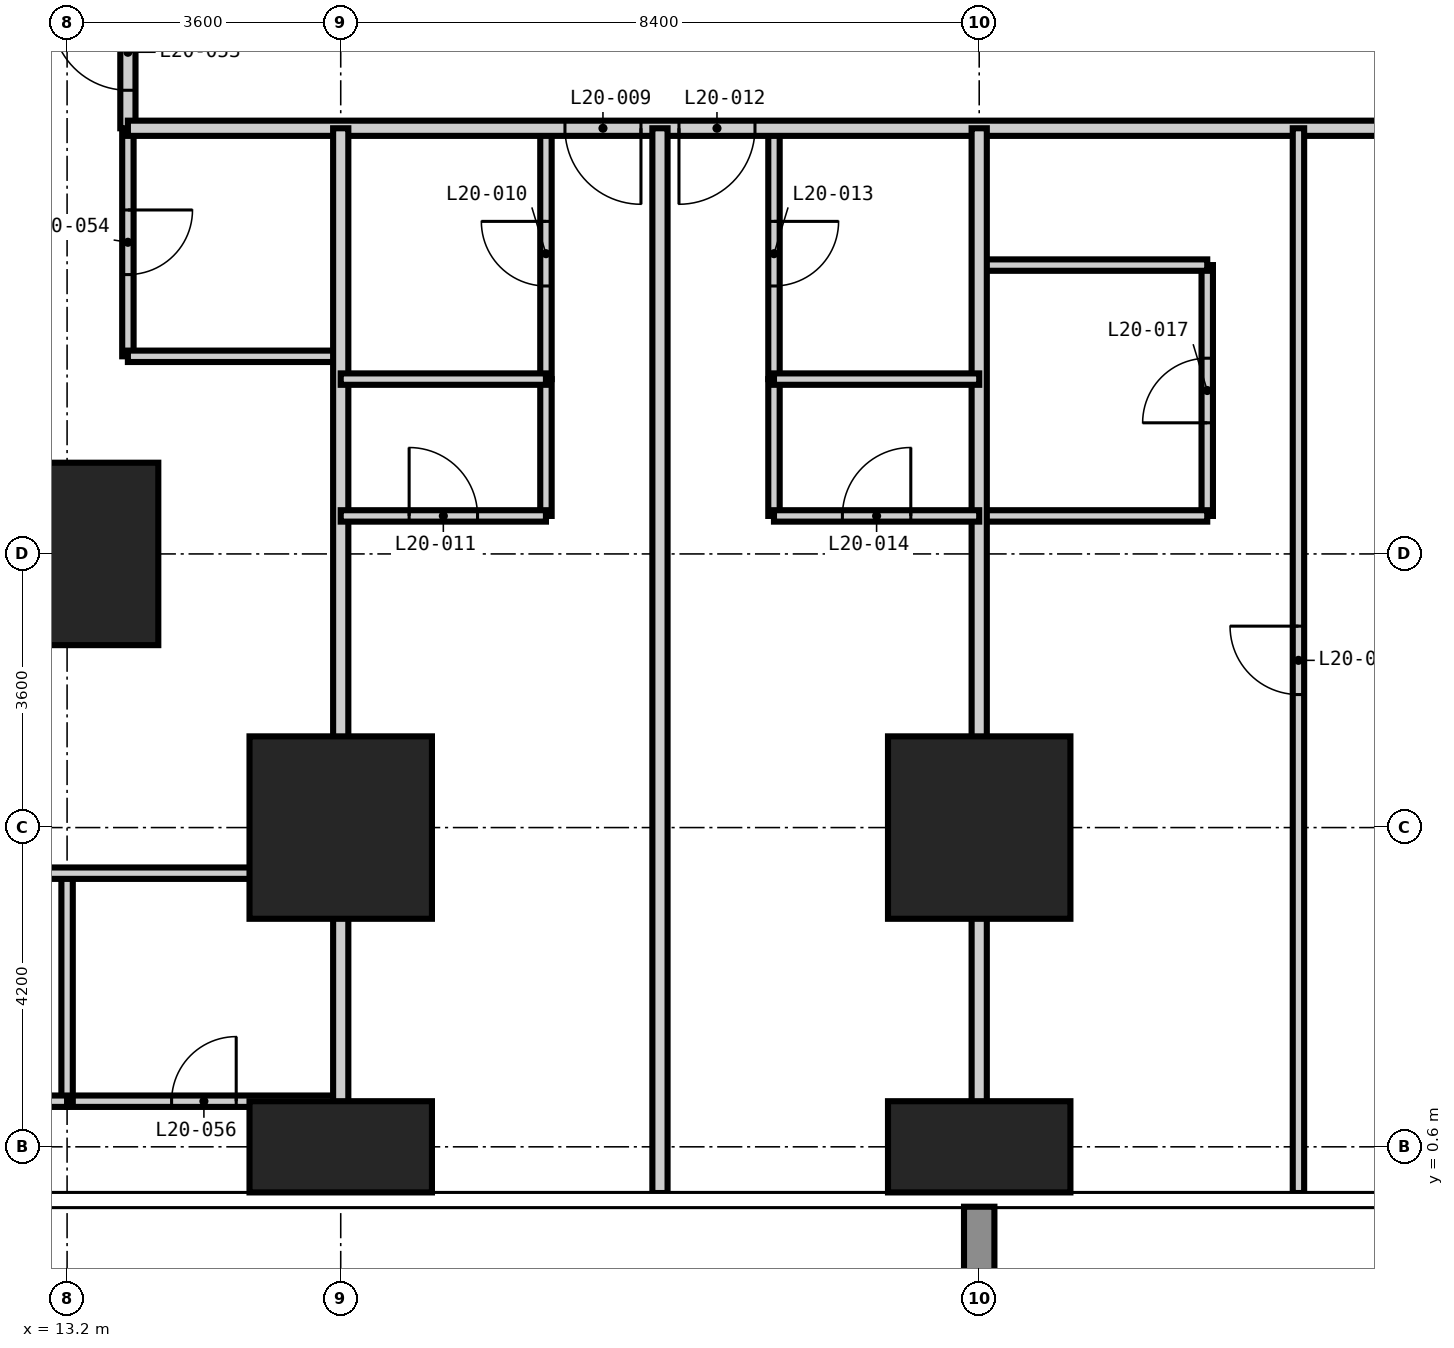
"""IFC4 building model, lengths in metres.
Left out: names, types, materials, properties, quantities, classifications, styles, units other than length and angle.
Written with IfcOpenShell. Run it as: python <this file> out.ifc"""

import sys

from ifc_helpers import new_model, si_unit, direction, frame, frame_2d, origin, origin_2d, place, context, subcontext, project, spatial, rectangle, extrude, element, fill, save


model = new_model("IFC4")
c1 = context("Model", 3, precision=1e-05, world=origin(), true_north=direction((0.0, 1.0)))
c2 = subcontext(c1, "Body", "Model", "MODEL_VIEW")
j1 = project(units=[si_unit("LENGTHUNIT", "METRE"), si_unit("PLANEANGLEUNIT", "RADIAN")], contexts=[c1])
p1 = place(None, origin())
s1 = spatial("IfcSite", under=j1, at=p1, CompositionType="ELEMENT")
p2 = place(p1, origin())
s2 = spatial("IfcBuilding", under=s1, at=p2, CompositionType="ELEMENT")
p3 = place(p2, frame((0.0, 0.0, 81.0)))
s3 = spatial("IfcBuildingStorey", under=s2, at=p3, CompositionType="ELEMENT", Elevation=81.0)
p4 = place(p3, frame((13.2, 8.4, -0.35), z_axis=(0.0, 0.0, 1.0), x_axis=(1.0, 0.0, 0.0)))
e1 = element("IfcColumn", 1, at=p4, inside=s3, PredefinedType="COLUMN", context=c2, shape_type="SweptSolid", body=[
    extrude(rectangle(XDim=2.4, YDim=2.4, at=origin_2d()), origin(), (0.0, 0.0, 1.0), 3.6),
])
p5 = place(p3, frame((16.8, 0.6, -0.35), z_axis=(0.0, 0.0, 1.0), x_axis=(1.0, 0.0, 0.0)))
e2 = element("IfcColumn", 2, at=p5, inside=s3, PredefinedType="COLUMN", context=c2, shape_type="SweptSolid", body=[
    extrude(rectangle(XDim=2.4, YDim=1.2, at=origin_2d()), origin(), (0.0, 0.0, 1.0), 3.6),
])
p6 = place(p3, frame((16.8, 4.8, -0.35), z_axis=(0.0, 0.0, 1.0), x_axis=(1.0, 0.0, 0.0)))
e3 = element("IfcColumn", 3, at=p6, inside=s3, PredefinedType="COLUMN", context=c2, shape_type="SweptSolid", body=[
    extrude(rectangle(XDim=2.4, YDim=2.4, at=origin_2d()), origin(), (0.0, 0.0, 1.0), 3.6),
])
p7 = place(p3, frame((25.2, 0.6, -0.35), z_axis=(0.0, 0.0, 1.0), x_axis=(1.0, 0.0, 0.0)))
e4 = element("IfcColumn", 4, at=p7, inside=s3, PredefinedType="COLUMN", context=c2, shape_type="SweptSolid", body=[
    extrude(rectangle(XDim=2.4, YDim=1.2, at=origin_2d()), origin(), (0.0, 0.0, 1.0), 3.6),
])
p8 = place(p3, frame((25.2, 4.8, -0.35), z_axis=(0.0, 0.0, 1.0), x_axis=(1.0, 0.0, 0.0)))
e5 = element("IfcColumn", 5, at=p8, inside=s3, PredefinedType="COLUMN", context=c2, shape_type="SweptSolid", body=[
    extrude(rectangle(XDim=2.4, YDim=2.4, at=origin_2d()), origin(), (0.0, 0.0, 1.0), 3.6),
])
p9 = place(p3, frame((14.0, 11.0, 0.0), z_axis=(0.0, 0.0, 1.0), x_axis=(0.0, 1.0, 0.0)))
e6 = element("IfcWall", 6, at=p9, inside=s3, PredefinedType="PARTITIONING", context=c2, shape_type="SweptSolid", body=[
    extrude(rectangle(XDim=3.0, YDim=0.15, at=frame_2d((1.5, 0.0))), origin(), (0.0, 0.0, 1.0), 3.25),
])
p10 = place(p9, frame((1.075, 0.0, 0.0)))
e7 = element("IfcOpeningElement", 7, at=p10, cuts=e6, PredefinedType="OPENING", context=c2, shape_type="SweptSolid", body=[
    extrude(rectangle(XDim=0.85, YDim=2.1, at=frame_2d((0.425, 1.05))), frame((0.0, 0.085, 0.0), z_axis=(0.0, -1.0, 0.0), x_axis=(1.0, 0.0, 0.0)), (0.0, 0.0, 1.0), 0.17),
])
p11 = place(p3, frame((19.5, 10.7, 0.0), z_axis=(0.0, 0.0, 1.0), x_axis=(0.0, 1.0, 0.0)))
e8 = element("IfcWall", 8, at=p11, inside=s3, PredefinedType="PARTITIONING", context=c2, shape_type="SweptSolid", body=[
    extrude(rectangle(XDim=3.3, YDim=0.15, at=frame_2d((1.65, 0.0))), origin(), (0.0, 0.0, 1.0), 3.25),
])
p12 = place(p11, frame((1.225, 0.0, 0.0)))
e9 = element("IfcOpeningElement", 9, at=p12, cuts=e8, PredefinedType="OPENING", context=c2, shape_type="SweptSolid", body=[
    extrude(rectangle(XDim=0.85, YDim=2.1, at=frame_2d((0.425, 1.05))), frame((0.0, 0.085, 0.0), z_axis=(0.0, -1.0, 0.0), x_axis=(1.0, 0.0, 0.0)), (0.0, 0.0, 1.0), 0.17),
])
p13 = place(p3, frame((22.5, 10.7, 0.0), z_axis=(0.0, 0.0, 1.0), x_axis=(0.0, 1.0, 0.0)))
e10 = element("IfcWall", 10, at=p13, inside=s3, PredefinedType="PARTITIONING", context=c2, shape_type="SweptSolid", body=[
    extrude(rectangle(XDim=3.3, YDim=0.15, at=frame_2d((1.65, 0.0))), origin(), (0.0, 0.0, 1.0), 3.25),
])
p14 = place(p13, frame((1.225, 0.0, 0.0)))
e11 = element("IfcOpeningElement", 11, at=p14, cuts=e10, PredefinedType="OPENING", context=c2, shape_type="SweptSolid", body=[
    extrude(rectangle(XDim=0.85, YDim=2.1, at=frame_2d((0.425, 1.05))), frame((0.0, 0.085, 0.0), z_axis=(0.0, -1.0, 0.0), x_axis=(1.0, 0.0, 0.0)), (0.0, 0.0, 1.0), 0.17),
])
p15 = place(p3, frame((28.2, 8.9, 0.0), z_axis=(0.0, 0.0, 1.0), x_axis=(0.0, 1.0, 0.0)))
e12 = element("IfcWall", 12, at=p15, inside=s3, PredefinedType="PARTITIONING", context=c2, shape_type="SweptSolid", body=[
    extrude(rectangle(XDim=3.3, YDim=0.15, at=frame_2d((1.65, 0.0))), origin(), (0.0, 0.0, 1.0), 3.25),
])
p16 = place(p15, frame((1.225, 0.0, 0.0)))
e13 = element("IfcOpeningElement", 13, at=p16, cuts=e12, PredefinedType="OPENING", context=c2, shape_type="SweptSolid", body=[
    extrude(rectangle(XDim=0.85, YDim=2.1, at=frame_2d((0.425, 1.05))), frame((0.0, 0.085, 0.0), z_axis=(0.0, -1.0, 0.0), x_axis=(1.0, 0.0, 0.0)), (0.0, 0.0, 1.0), 0.17),
])
p17 = place(p3, frame((13.2, 1.2, 0.0), z_axis=(0.0, 0.0, 1.0), x_axis=(1.0, 0.0, 0.0)))
e14 = element("IfcWall", 14, at=p17, inside=s3, PredefinedType="PARTITIONING", context=c2, shape_type="SweptSolid", body=[
    extrude(rectangle(XDim=3.6, YDim=0.15, at=frame_2d((1.8, 0.0))), origin(), (0.0, 0.0, 1.0), 3.25),
])
p18 = place(p17, frame((1.375, 0.0, 0.0)))
e15 = element("IfcOpeningElement", 15, at=p18, cuts=e14, PredefinedType="OPENING", context=c2, shape_type="SweptSolid", body=[
    extrude(rectangle(XDim=0.85, YDim=2.1, at=frame_2d((0.425, 1.05))), frame((0.0, 0.085, 0.0), z_axis=(0.0, -1.0, 0.0), x_axis=(1.0, 0.0, 0.0)), (0.0, 0.0, 1.0), 0.17),
])
p19 = place(p3, frame((25.2, 8.9, 0.0), z_axis=(0.0, 0.0, 1.0), x_axis=(1.0, 0.0, 0.0)))
e16 = element("IfcWall", 16, at=p19, inside=s3, PredefinedType="PARTITIONING", context=c2, shape_type="SweptSolid", body=[
    extrude(rectangle(XDim=3.0, YDim=0.15, at=frame_2d((1.5, 0.0))), origin(), (0.0, 0.0, 1.0), 3.25),
])
p20 = place(p3, frame((14.0, 11.0, 0.0), z_axis=(0.0, 0.0, 1.0), x_axis=(1.0, 0.0, 0.0)))
e17 = element("IfcWall", 17, at=p20, inside=s3, PredefinedType="PARTITIONING", context=c2, shape_type="SweptSolid", body=[
    extrude(rectangle(XDim=2.8, YDim=0.15, at=frame_2d((1.4, 0.0))), origin(), (0.0, 0.0, 1.0), 3.25),
])
p21 = place(p3, frame((25.2, 12.2, 0.0), z_axis=(0.0, 0.0, 1.0), x_axis=(1.0, 0.0, 0.0)))
e18 = element("IfcWall", 18, at=p21, inside=s3, PredefinedType="PARTITIONING", context=c2, shape_type="SweptSolid", body=[
    extrude(rectangle(XDim=3.0, YDim=0.15, at=frame_2d((1.5, 0.0))), origin(), (0.0, 0.0, 1.0), 3.25),
])
p22 = place(p3, frame((14.0, 14.0, 0.0), z_axis=(0.0, 0.0, 1.0), x_axis=(0.0, 1.0, 0.0)))
e19 = element("IfcWall", 19, at=p22, inside=s3, PredefinedType="PARTITIONING", context=c2, shape_type="SweptSolid", body=[
    extrude(rectangle(XDim=32.0, YDim=0.2, at=frame_2d((16.0, 0.0))), origin(), (0.0, 0.0, 1.0), 3.25),
])
p23 = place(p22, frame((5.75, 0.0, 0.0)))
e20 = element("IfcOpeningElement", 20, at=p23, cuts=e19, PredefinedType="OPENING", context=c2, shape_type="SweptSolid", body=[
    extrude(rectangle(XDim=1.0, YDim=2.2, at=frame_2d((0.5, 1.1))), frame((0.0, 0.11, 0.0), z_axis=(0.0, -1.0, 0.0), x_axis=(1.0, 0.0, 0.0)), (0.0, 0.0, 1.0), 0.22),
])
p24 = place(p22, frame((12.5, 0.0, 0.0)))
e21 = element("IfcOpeningElement", 21, at=p24, cuts=e19, PredefinedType="OPENING", context=c2, shape_type="SweptSolid", body=[
    extrude(rectangle(XDim=1.0, YDim=2.2, at=frame_2d((0.5, 1.1))), frame((0.0, 0.11, 0.0), z_axis=(0.0, -1.0, 0.0), x_axis=(1.0, 0.0, 0.0)), (0.0, 0.0, 1.0), 0.22),
])
p25 = place(p22, frame((17.3, 0.0, 0.0)))
e22 = element("IfcOpeningElement", 22, at=p25, cuts=e19, PredefinedType="OPENING", context=c2, shape_type="SweptSolid", body=[
    extrude(rectangle(XDim=1.0, YDim=2.2, at=frame_2d((0.5, 1.1))), frame((0.0, 0.11, 0.0), z_axis=(0.0, -1.0, 0.0), x_axis=(1.0, 0.0, 0.0)), (0.0, 0.0, 1.0), 0.22),
])
p26 = place(p22, frame((24.05, 0.0, 0.0)))
e23 = element("IfcOpeningElement", 23, at=p26, cuts=e19, PredefinedType="OPENING", context=c2, shape_type="SweptSolid", body=[
    extrude(rectangle(XDim=1.0, YDim=2.2, at=frame_2d((0.5, 1.1))), frame((0.0, 0.11, 0.0), z_axis=(0.0, -1.0, 0.0), x_axis=(1.0, 0.0, 0.0)), (0.0, 0.0, 1.0), 0.22),
])
p27 = place(p22, frame((0.5, 0.0, 0.0)))
e24 = element("IfcOpeningElement", 24, at=p27, cuts=e19, PredefinedType="OPENING", context=c2, shape_type="SweptSolid", body=[
    extrude(rectangle(XDim=1.0, YDim=2.2, at=frame_2d((0.5, 1.1))), frame((0.0, 0.11, 0.0), z_axis=(0.0, -1.0, 0.0), x_axis=(1.0, 0.0, 0.0)), (0.0, 0.0, 1.0), 0.22),
])
p28 = place(p22, frame((29.5, 0.0, 0.0)))
e25 = element("IfcOpeningElement", 25, at=p28, cuts=e19, PredefinedType="OPENING", context=c2, shape_type="SweptSolid", body=[
    extrude(rectangle(XDim=1.0, YDim=2.2, at=frame_2d((0.5, 1.1))), frame((0.0, 0.11, 0.0), z_axis=(0.0, -1.0, 0.0), x_axis=(1.0, 0.0, 0.0)), (0.0, 0.0, 1.0), 0.22),
])
p29 = place(p3, frame((45.4, 14.0, 0.0), z_axis=(0.0, 0.0, 1.0), x_axis=(-1.0, 0.0, 0.0)))
e26 = element("IfcWall", 26, at=p29, inside=s3, PredefinedType="PARTITIONING", context=c2, shape_type="SweptSolid", body=[
    extrude(rectangle(XDim=31.4, YDim=0.2, at=frame_2d((15.7, 0.0))), origin(), (0.0, 0.0, 1.0), 3.25),
])
p30 = place(p29, frame((24.65, 0.0, 0.0)))
e27 = element("IfcOpeningElement", 27, at=p30, cuts=e26, PredefinedType="OPENING", context=c2, shape_type="SweptSolid", body=[
    extrude(rectangle(XDim=1.0, YDim=2.2, at=frame_2d((0.5, 1.1))), frame((0.0, 0.11, 0.0), z_axis=(0.0, -1.0, 0.0), x_axis=(1.0, 0.0, 0.0)), (0.0, 0.0, 1.0), 0.22),
])
p31 = place(p29, frame((23.15, 0.0, 0.0)))
e28 = element("IfcOpeningElement", 28, at=p31, cuts=e26, PredefinedType="OPENING", context=c2, shape_type="SweptSolid", body=[
    extrude(rectangle(XDim=1.0, YDim=2.2, at=frame_2d((0.5, 1.1))), frame((0.0, 0.11, 0.0), z_axis=(0.0, -1.0, 0.0), x_axis=(1.0, 0.0, 0.0)), (0.0, 0.0, 1.0), 0.22),
])
p32 = place(p29, frame((13.4, 0.0, 0.0)))
e29 = element("IfcOpeningElement", 29, at=p32, cuts=e26, PredefinedType="OPENING", context=c2, shape_type="SweptSolid", body=[
    extrude(rectangle(XDim=1.0, YDim=2.2, at=frame_2d((0.5, 1.1))), frame((0.0, 0.11, 0.0), z_axis=(0.0, -1.0, 0.0), x_axis=(1.0, 0.0, 0.0)), (0.0, 0.0, 1.0), 0.22),
])
p33 = place(p29, frame((6.35, 0.0, 0.0)))
e30 = element("IfcOpeningElement", 30, at=p33, cuts=e26, PredefinedType="OPENING", context=c2, shape_type="SweptSolid", body=[
    extrude(rectangle(XDim=1.0, YDim=2.2, at=frame_2d((0.5, 1.1))), frame((0.0, 0.11, 0.0), z_axis=(0.0, -1.0, 0.0), x_axis=(1.0, 0.0, 0.0)), (0.0, 0.0, 1.0), 0.22),
])
for number, where, z_axis, x_axis in (
    (31, (16.8, -0.008, 0.0), (0.0, 0.0, 1.0), (0.0, 1.0, 0.0)),
    (32, (21.0, -0.008, 0.0), (0.0, 0.0, 1.0), (0.0, 1.0, 0.0)),
    (33, (25.2, -0.008, 0.0), (0.0, 0.0, 1.0), (0.0, 1.0, 0.0)),
):
    element("IfcWall", number, at=place(p3, frame(where, z_axis=z_axis, x_axis=x_axis)), inside=s3, PredefinedType="PARTITIONING", context=c2, shape_type="SweptSolid", body=[
        extrude(rectangle(XDim=14.008, YDim=0.2, at=frame_2d((7.004, 0.0))), origin(), (0.0, 0.0, 1.0), 3.25),
    ])
p34 = place(p3, frame((13.2, 1.2, 0.0), z_axis=(0.0, 0.0, 1.0), x_axis=(0.0, 1.0, 0.0)))
e34 = element("IfcWall", 34, at=p34, inside=s3, PredefinedType="PARTITIONING", context=c2, shape_type="SweptSolid", body=[
    extrude(rectangle(XDim=3.0, YDim=0.15, at=frame_2d((1.5, 0.0))), origin(), (0.0, 0.0, 1.0), 3.25),
])
for number, where, z_axis, x_axis in (
    (35, (19.5, 8.9, 0.0), (0.0, 0.0, 1.0), (0.0, 1.0, 0.0)),
    (36, (22.5, 8.9, 0.0), (0.0, 0.0, 1.0), (0.0, 1.0, 0.0)),
):
    element("IfcWall", number, at=place(p3, frame(where, z_axis=z_axis, x_axis=x_axis)), inside=s3, PredefinedType="PARTITIONING", context=c2, shape_type="SweptSolid", body=[
        extrude(rectangle(XDim=1.8, YDim=0.15, at=frame_2d((0.9, 0.0))), origin(), (0.0, 0.0, 1.0), 3.25),
    ])
p35 = place(p3, frame((29.4, -0.008, 0.0), z_axis=(0.0, 0.0, 1.0), x_axis=(0.0, 1.0, 0.0)))
e37 = element("IfcWall", 37, at=p35, inside=s3, PredefinedType="PARTITIONING", context=c2, shape_type="SweptSolid", body=[
    extrude(rectangle(XDim=14.008, YDim=0.15, at=frame_2d((7.004, 0.0))), origin(), (0.0, 0.0, 1.0), 3.25),
])
p36 = place(p35, frame((6.558, 0.0, 0.0)))
e38 = element("IfcOpeningElement", 38, at=p36, cuts=e37, PredefinedType="OPENING", context=c2, shape_type="SweptSolid", body=[
    extrude(rectangle(XDim=0.9, YDim=2.1, at=frame_2d((0.45, 1.05))), frame((0.0, 0.085, 0.0), z_axis=(0.0, -1.0, 0.0), x_axis=(1.0, 0.0, 0.0)), (0.0, 0.0, 1.0), 0.17),
])
p37 = place(p3, frame((10.8, 1.2, 0.0), z_axis=(0.0, 0.0, 1.0), x_axis=(1.0, 0.0, 0.0)))
e39 = element("IfcWall", 39, at=p37, inside=s3, PredefinedType="PARTITIONING", context=c2, shape_type="SweptSolid", body=[
    extrude(rectangle(XDim=2.4, YDim=0.15, at=frame_2d((1.2, 0.0))), origin(), (0.0, 0.0, 1.0), 3.25),
])
p38 = place(p3, frame((-0.008, 4.2, 0.0), z_axis=(0.0, 0.0, 1.0), x_axis=(1.0, 0.0, 0.0)))
e40 = element("IfcWall", 40, at=p38, inside=s3, PredefinedType="PARTITIONING", context=c2, shape_type="SweptSolid", body=[
    extrude(rectangle(XDim=16.808, YDim=0.15, at=frame_2d((8.404, 0.0))), origin(), (0.0, 0.0, 1.0), 3.25),
])
p39 = place(p38, frame((4.958, 0.0, 0.0)))
e41 = element("IfcOpeningElement", 41, at=p39, cuts=e40, PredefinedType="OPENING", context=c2, shape_type="SweptSolid", body=[
    extrude(rectangle(XDim=0.9, YDim=2.1, at=frame_2d((0.45, 1.05))), frame((0.0, 0.085, 0.0), z_axis=(0.0, -1.0, 0.0), x_axis=(1.0, 0.0, 0.0)), (0.0, 0.0, 1.0), 0.17),
])
p40 = place(p3, frame((16.8, 8.9, 0.0), z_axis=(0.0, 0.0, 1.0), x_axis=(1.0, 0.0, 0.0)))
e42 = element("IfcWall", 42, at=p40, inside=s3, PredefinedType="PARTITIONING", context=c2, shape_type="SweptSolid", body=[
    extrude(rectangle(XDim=2.7, YDim=0.15, at=frame_2d((1.35, 0.0))), origin(), (0.0, 0.0, 1.0), 3.25),
])
p41 = place(p40, frame((0.9, 0.0, 0.0)))
e43 = element("IfcOpeningElement", 43, at=p41, cuts=e42, PredefinedType="OPENING", context=c2, shape_type="SweptSolid", body=[
    extrude(rectangle(XDim=0.9, YDim=2.1, at=frame_2d((0.45, 1.05))), frame((0.0, 0.085, 0.0), z_axis=(0.0, -1.0, 0.0), x_axis=(1.0, 0.0, 0.0)), (0.0, 0.0, 1.0), 0.17),
])
p42 = place(p3, frame((22.5, 8.9, 0.0), z_axis=(0.0, 0.0, 1.0), x_axis=(1.0, 0.0, 0.0)))
e44 = element("IfcWall", 44, at=p42, inside=s3, PredefinedType="PARTITIONING", context=c2, shape_type="SweptSolid", body=[
    extrude(rectangle(XDim=2.7, YDim=0.15, at=frame_2d((1.35, 0.0))), origin(), (0.0, 0.0, 1.0), 3.25),
])
p43 = place(p42, frame((0.9, 0.0, 0.0)))
e45 = element("IfcOpeningElement", 45, at=p43, cuts=e44, PredefinedType="OPENING", context=c2, shape_type="SweptSolid", body=[
    extrude(rectangle(XDim=0.9, YDim=2.1, at=frame_2d((0.45, 1.05))), frame((0.0, 0.085, 0.0), z_axis=(0.0, -1.0, 0.0), x_axis=(1.0, 0.0, 0.0)), (0.0, 0.0, 1.0), 0.17),
])
for number, where, z_axis, x_axis in (
    (46, (16.8, 10.7, 0.0), (0.0, 0.0, 1.0), (1.0, 0.0, 0.0)),
    (47, (22.5, 10.7, 0.0), (0.0, 0.0, 1.0), (1.0, 0.0, 0.0)),
):
    element("IfcWall", number, at=place(p3, frame(where, z_axis=z_axis, x_axis=x_axis)), inside=s3, PredefinedType="PARTITIONING", context=c2, shape_type="SweptSolid", body=[
        extrude(rectangle(XDim=2.7, YDim=0.15, at=frame_2d((1.35, 0.0))), origin(), (0.0, 0.0, 1.0), 3.25),
    ])
p44 = place(p30, origin())
e48 = element("IfcDoor", 48, at=p44, inside=s3, OperationType="SINGLE_SWING_LEFT", PredefinedType="DOOR", context=c2, shape_type="SweptSolid", body=[
    extrude(rectangle(XDim=1.0, YDim=2.2, at=frame_2d((0.5, 1.1))), frame((0.0, 0.025, 0.0), z_axis=(0.0, -1.0, 0.0), x_axis=(1.0, 0.0, 0.0)), (0.0, 0.0, 1.0), 0.05),
])
fill(e27, e48)
p45 = place(p12, origin())
e49 = element("IfcDoor", 49, at=p45, inside=s3, OperationType="SINGLE_SWING_RIGHT", PredefinedType="DOOR", context=c2, shape_type="SweptSolid", body=[
    extrude(rectangle(XDim=0.85, YDim=2.1, at=frame_2d((0.425, 1.05))), frame((0.0, 0.025, 0.0), z_axis=(0.0, -1.0, 0.0), x_axis=(1.0, 0.0, 0.0)), (0.0, 0.0, 1.0), 0.05),
])
fill(e9, e49)
p46 = place(p41, origin())
e50 = element("IfcDoor", 50, at=p46, inside=s3, OperationType="SINGLE_SWING_LEFT", PredefinedType="DOOR", context=c2, shape_type="SweptSolid", body=[
    extrude(rectangle(XDim=0.9, YDim=2.1, at=frame_2d((0.45, 1.05))), frame((0.0, 0.025, 0.0), z_axis=(0.0, -1.0, 0.0), x_axis=(1.0, 0.0, 0.0)), (0.0, 0.0, 1.0), 0.05),
])
fill(e43, e50)
p47 = place(p31, origin())
e51 = element("IfcDoor", 51, at=p47, inside=s3, OperationType="SINGLE_SWING_RIGHT", PredefinedType="DOOR", context=c2, shape_type="SweptSolid", body=[
    extrude(rectangle(XDim=1.0, YDim=2.2, at=frame_2d((0.5, 1.1))), frame((0.0, 0.025, 0.0), z_axis=(0.0, -1.0, 0.0), x_axis=(1.0, 0.0, 0.0)), (0.0, 0.0, 1.0), 0.05),
])
fill(e28, e51)
p48 = place(p14, frame((0.85, 0.0, 0.0), z_axis=(0.0, 0.0, 1.0), x_axis=(-1.0, 0.0, 0.0)))
e52 = element("IfcDoor", 52, at=p48, inside=s3, OperationType="SINGLE_SWING_LEFT", PredefinedType="DOOR", context=c2, shape_type="SweptSolid", body=[
    extrude(rectangle(XDim=0.85, YDim=2.1, at=frame_2d((0.425, 1.05))), frame((0.0, 0.025, 0.0), z_axis=(0.0, -1.0, 0.0), x_axis=(1.0, 0.0, 0.0)), (0.0, 0.0, 1.0), 0.05),
])
fill(e11, e52)
p49 = place(p43, origin())
e53 = element("IfcDoor", 53, at=p49, inside=s3, OperationType="SINGLE_SWING_RIGHT", PredefinedType="DOOR", context=c2, shape_type="SweptSolid", body=[
    extrude(rectangle(XDim=0.9, YDim=2.1, at=frame_2d((0.45, 1.05))), frame((0.0, 0.025, 0.0), z_axis=(0.0, -1.0, 0.0), x_axis=(1.0, 0.0, 0.0)), (0.0, 0.0, 1.0), 0.05),
])
fill(e45, e53)
p50 = place(p36, origin())
e54 = element("IfcDoor", 54, at=p50, inside=s3, OperationType="SINGLE_SWING_RIGHT", PredefinedType="DOOR", context=c2, shape_type="SweptSolid", body=[
    extrude(rectangle(XDim=0.9, YDim=2.1, at=frame_2d((0.45, 1.05))), frame((0.0, 0.025, 0.0), z_axis=(0.0, -1.0, 0.0), x_axis=(1.0, 0.0, 0.0)), (0.0, 0.0, 1.0), 0.05),
])
fill(e38, e54)
p51 = place(p16, origin())
e55 = element("IfcDoor", 55, at=p51, inside=s3, OperationType="SINGLE_SWING_LEFT", PredefinedType="DOOR", context=c2, shape_type="SweptSolid", body=[
    extrude(rectangle(XDim=0.85, YDim=2.1, at=frame_2d((0.425, 1.05))), frame((0.0, 0.025, 0.0), z_axis=(0.0, -1.0, 0.0), x_axis=(1.0, 0.0, 0.0)), (0.0, 0.0, 1.0), 0.05),
])
fill(e13, e55)
p52 = place(p27, origin())
e56 = element("IfcDoor", 56, at=p52, inside=s3, OperationType="SINGLE_SWING_RIGHT", PredefinedType="DOOR", context=c2, shape_type="SweptSolid", body=[
    extrude(rectangle(XDim=1.0, YDim=2.2, at=frame_2d((0.5, 1.1))), frame((0.0, 0.025, 0.0), z_axis=(0.0, -1.0, 0.0), x_axis=(1.0, 0.0, 0.0)), (0.0, 0.0, 1.0), 0.05),
])
fill(e24, e56)
p53 = place(p10, frame((0.85, 0.0, 0.0), z_axis=(0.0, 0.0, 1.0), x_axis=(-1.0, 0.0, 0.0)))
e57 = element("IfcDoor", 57, at=p53, inside=s3, OperationType="SINGLE_SWING_LEFT", PredefinedType="DOOR", context=c2, shape_type="SweptSolid", body=[
    extrude(rectangle(XDim=0.85, YDim=2.1, at=frame_2d((0.425, 1.05))), frame((0.0, 0.025, 0.0), z_axis=(0.0, -1.0, 0.0), x_axis=(1.0, 0.0, 0.0)), (0.0, 0.0, 1.0), 0.05),
])
fill(e7, e57)
p54 = place(p18, origin())
e58 = element("IfcDoor", 58, at=p54, inside=s3, OperationType="SINGLE_SWING_RIGHT", PredefinedType="DOOR", context=c2, shape_type="SweptSolid", body=[
    extrude(rectangle(XDim=0.85, YDim=2.1, at=frame_2d((0.425, 1.05))), frame((0.0, 0.025, 0.0), z_axis=(0.0, -1.0, 0.0), x_axis=(1.0, 0.0, 0.0)), (0.0, 0.0, 1.0), 0.05),
])
fill(e15, e58)
save(model, sys.argv[1])
